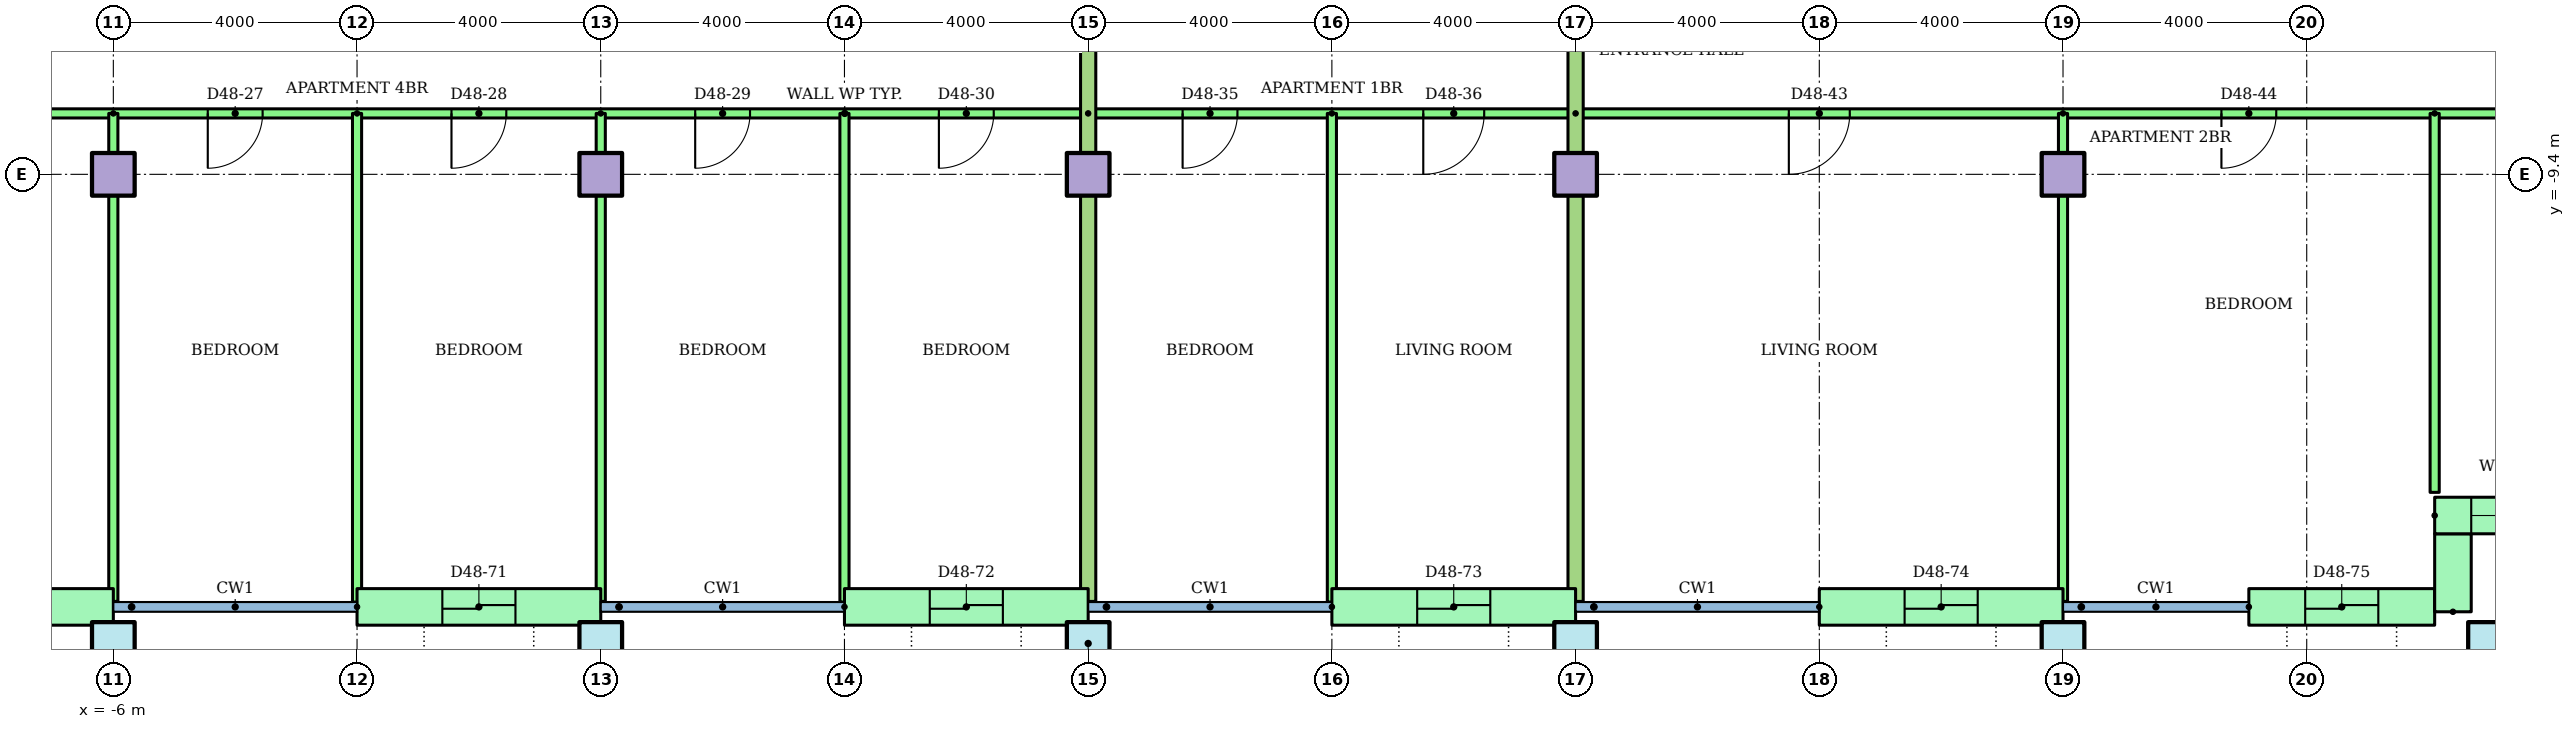
"""IFC4 building model, lengths in metres.
Left out: names, types, materials, properties, quantities, classifications, styles, units other than length and angle.
Written with IfcOpenShell. Run it as: python <this file> out.ifc"""

import sys

from ifc_helpers import new_model, si_unit, direction, frame, frame_2d, origin, origin_2d, place, context, subcontext, project, spatial, rectangle, hollow_rectangle, extrude, element, fill, save


model = new_model("IFC4")
c1 = context("Model", 3, precision=1e-05, world=origin(), true_north=direction((0.0, 1.0)))
c2 = subcontext(c1, "Body", "Model", "MODEL_VIEW")
j1 = project(units=[si_unit("LENGTHUNIT", "METRE"), si_unit("PLANEANGLEUNIT", "RADIAN")], contexts=[c1])
p1 = place(None, origin())
s1 = spatial("IfcSite", under=j1, at=p1, CompositionType="ELEMENT")
p2 = place(p1, origin())
s2 = spatial("IfcBuilding", under=s1, at=p2, CompositionType="ELEMENT")
p3 = place(p2, frame((0.0, 0.0, 184.5)))
s3 = spatial("IfcBuildingStorey", under=s2, at=p3, CompositionType="ELEMENT", Elevation=184.5)
for number, where in (
    (1, (-6.0, -17.1, 0.0)),
    (2, (2.0, -17.1, 0.0)),
    (3, (10.0, -17.1, 0.0)),
    (4, (18.0, -17.1, 0.0)),
    (5, (26.0, -17.1, 0.0)),
    (6, (33.0, -17.1, 0.0)),
):
    element("IfcColumn", number, at=place(p3, frame(where)), inside=s3, PredefinedType="COLUMN", context=c2, shape_type="SweptSolid", body=[
        extrude(hollow_rectangle(XDim=0.7, YDim=0.7, WallThickness=0.036, at=origin_2d()), origin(), (0.0, 0.0, 1.0), 3.2),
    ])
for number, where in (
    (7, (-6.0, -9.4, 0.0)),
    (8, (2.0, -9.4, 0.0)),
    (9, (10.0, -9.4, 0.0)),
    (10, (18.0, -9.4, 0.0)),
    (11, (26.0, -9.4, 0.0)),
):
    element("IfcColumn", number, at=place(p3, frame(where)), inside=s3, PredefinedType="COLUMN", context=c2, shape_type="SweptSolid", body=[
        extrude(rectangle(XDim=0.7, YDim=0.7, at=origin_2d()), origin(), (0.0, 0.0, 1.0), 3.2),
    ])
p4 = place(p3, frame((-10.0, -16.5, 0.0)))
e12 = element("IfcWall", 12, at=p4, inside=s3, PredefinedType="STANDARD", context=c2, shape_type="SweptSolid", body=[
    extrude(rectangle(XDim=4.0, YDim=0.6, at=frame_2d((2.0, 0.0))), origin(), (0.0, 0.0, 1.0), 2.92),
])
p5 = place(p4, frame((1.4, 0.0, 0.0)))
e13 = element("IfcOpeningElement", 13, at=p5, cuts=e12, PredefinedType="OPENING", context=c2, shape_type="SweptSolid", body=[
    extrude(rectangle(XDim=1.2, YDim=2.1, at=frame_2d((0.6, 1.05))), frame((0.0, 0.31, 0.0), z_axis=(0.0, -1.0, 0.0), x_axis=(1.0, 0.0, 0.0)), (0.0, 0.0, 1.0), 0.62),
])
p6 = place(p3, frame((-2.0, -16.5, 0.0)))
e14 = element("IfcWall", 14, at=p6, inside=s3, PredefinedType="STANDARD", context=c2, shape_type="SweptSolid", body=[
    extrude(rectangle(XDim=4.0, YDim=0.6, at=frame_2d((2.0, 0.0))), origin(), (0.0, 0.0, 1.0), 2.92),
])
p7 = place(p6, frame((1.4, 0.0, 0.0)))
e15 = element("IfcOpeningElement", 15, at=p7, cuts=e14, PredefinedType="OPENING", context=c2, shape_type="SweptSolid", body=[
    extrude(rectangle(XDim=1.2, YDim=2.1, at=frame_2d((0.6, 1.05))), frame((0.0, 0.31, 0.0), z_axis=(0.0, -1.0, 0.0), x_axis=(1.0, 0.0, 0.0)), (0.0, 0.0, 1.0), 0.62),
])
p8 = place(p3, frame((6.0, -16.5, 0.0)))
e16 = element("IfcWall", 16, at=p8, inside=s3, PredefinedType="STANDARD", context=c2, shape_type="SweptSolid", body=[
    extrude(rectangle(XDim=4.0, YDim=0.6, at=frame_2d((2.0, 0.0))), origin(), (0.0, 0.0, 1.0), 2.92),
])
p9 = place(p8, frame((1.4, 0.0, 0.0)))
e17 = element("IfcOpeningElement", 17, at=p9, cuts=e16, PredefinedType="OPENING", context=c2, shape_type="SweptSolid", body=[
    extrude(rectangle(XDim=1.2, YDim=2.1, at=frame_2d((0.6, 1.05))), frame((0.0, 0.31, 0.0), z_axis=(0.0, -1.0, 0.0), x_axis=(1.0, 0.0, 0.0)), (0.0, 0.0, 1.0), 0.62),
])
p10 = place(p3, frame((14.0, -16.5, 0.0)))
e18 = element("IfcWall", 18, at=p10, inside=s3, PredefinedType="STANDARD", context=c2, shape_type="SweptSolid", body=[
    extrude(rectangle(XDim=4.0, YDim=0.6, at=frame_2d((2.0, 0.0))), origin(), (0.0, 0.0, 1.0), 2.92),
])
p11 = place(p10, frame((1.4, 0.0, 0.0)))
e19 = element("IfcOpeningElement", 19, at=p11, cuts=e18, PredefinedType="OPENING", context=c2, shape_type="SweptSolid", body=[
    extrude(rectangle(XDim=1.2, YDim=2.1, at=frame_2d((0.6, 1.05))), frame((0.0, 0.31, 0.0), z_axis=(0.0, -1.0, 0.0), x_axis=(1.0, 0.0, 0.0)), (0.0, 0.0, 1.0), 0.62),
])
p12 = place(p3, frame((22.0, -16.5, 0.0)))
e20 = element("IfcWall", 20, at=p12, inside=s3, PredefinedType="STANDARD", context=c2, shape_type="SweptSolid", body=[
    extrude(rectangle(XDim=4.0, YDim=0.6, at=frame_2d((2.0, 0.0))), origin(), (0.0, 0.0, 1.0), 2.92),
])
p13 = place(p12, frame((1.4, 0.0, 0.0)))
e21 = element("IfcOpeningElement", 21, at=p13, cuts=e20, PredefinedType="OPENING", context=c2, shape_type="SweptSolid", body=[
    extrude(rectangle(XDim=1.2, YDim=2.1, at=frame_2d((0.6, 1.05))), frame((0.0, 0.31, 0.0), z_axis=(0.0, -1.0, 0.0), x_axis=(1.0, 0.0, 0.0)), (0.0, 0.0, 1.0), 0.62),
])
p14 = place(p3, frame((29.05, -16.5, 0.0)))
e22 = element("IfcWall", 22, at=p14, inside=s3, PredefinedType="STANDARD", context=c2, shape_type="SweptSolid", body=[
    extrude(rectangle(XDim=3.05, YDim=0.6, at=frame_2d((1.525, 0.0))), origin(), (0.0, 0.0, 1.0), 2.92),
])
p15 = place(p14, frame((0.925, 0.0, 0.0)))
e23 = element("IfcOpeningElement", 23, at=p15, cuts=e22, PredefinedType="OPENING", context=c2, shape_type="SweptSolid", body=[
    extrude(rectangle(XDim=1.2, YDim=2.1, at=frame_2d((0.6, 1.05))), frame((0.0, 0.31, 0.0), z_axis=(0.0, -1.0, 0.0), x_axis=(1.0, 0.0, 0.0)), (0.0, 0.0, 1.0), 0.62),
])
p16 = place(p3, frame((32.4, -16.58, 0.0), z_axis=(0.0, 0.0, 1.0), x_axis=(0.0, 1.0, 0.0)))
e24 = element("IfcWall", 24, at=p16, inside=s3, PredefinedType="STANDARD", context=c2, shape_type="SweptSolid", body=[
    extrude(rectangle(XDim=1.28, YDim=0.6, at=frame_2d((0.64, 0.0))), origin(), (0.0, 0.0, 1.0), 2.92),
])
p17 = place(p3, frame((32.1, -15.0, 0.0)))
e25 = element("IfcWall", 25, at=p17, inside=s3, PredefinedType="STANDARD", context=c2, shape_type="SweptSolid", body=[
    extrude(rectangle(XDim=2.1, YDim=0.6, at=frame_2d((1.05, 0.0))), origin(), (0.0, 0.0, 1.0), 2.92),
])
p18 = place(p17, frame((0.6, 0.0, 0.9)))
e26 = element("IfcOpeningElement", 26, at=p18, cuts=e25, PredefinedType="OPENING", context=c2, shape_type="SweptSolid", body=[
    extrude(rectangle(XDim=0.9, YDim=1.5, at=frame_2d((0.45, 0.75))), frame((0.0, 0.31, 0.0), z_axis=(0.0, -1.0, 0.0), x_axis=(1.0, 0.0, 0.0)), (0.0, 0.0, 1.0), 0.62),
])
p19 = place(p3, frame((10.0, -8.4, 0.0), z_axis=(0.0, 0.0, 1.0), x_axis=(-1.0, 0.0, 0.0)))
e27 = element("IfcWall", 27, at=p19, inside=s3, PredefinedType="PARTITIONING", context=c2, shape_type="SweptSolid", body=[
    extrude(rectangle(XDim=24.0, YDim=0.15, at=frame_2d((12.0, 0.0))), origin(), (0.0, 0.0, 1.0), 2.4),
])
p20 = place(p19, frame((19.5, 0.0, 0.0)))
e28 = element("IfcOpeningElement", 28, at=p20, cuts=e27, PredefinedType="OPENING", context=c2, shape_type="SweptSolid", body=[
    extrude(rectangle(XDim=1.0, YDim=2.1, at=frame_2d((0.5, 1.05))), frame((0.0, 0.085, 0.0), z_axis=(0.0, -1.0, 0.0), x_axis=(1.0, 0.0, 0.0)), (0.0, 0.0, 1.0), 0.17),
])
p21 = place(p19, frame((13.55, 0.0, 0.0)))
e29 = element("IfcOpeningElement", 29, at=p21, cuts=e27, PredefinedType="OPENING", context=c2, shape_type="SweptSolid", body=[
    extrude(rectangle(XDim=0.9, YDim=2.1, at=frame_2d((0.45, 1.05))), frame((0.0, 0.085, 0.0), z_axis=(0.0, -1.0, 0.0), x_axis=(1.0, 0.0, 0.0)), (0.0, 0.0, 1.0), 0.17),
])
p22 = place(p19, frame((9.55, 0.0, 0.0)))
e30 = element("IfcOpeningElement", 30, at=p22, cuts=e27, PredefinedType="OPENING", context=c2, shape_type="SweptSolid", body=[
    extrude(rectangle(XDim=0.9, YDim=2.1, at=frame_2d((0.45, 1.05))), frame((0.0, 0.085, 0.0), z_axis=(0.0, -1.0, 0.0), x_axis=(1.0, 0.0, 0.0)), (0.0, 0.0, 1.0), 0.17),
])
p23 = place(p19, frame((5.55, 0.0, 0.0)))
e31 = element("IfcOpeningElement", 31, at=p23, cuts=e27, PredefinedType="OPENING", context=c2, shape_type="SweptSolid", body=[
    extrude(rectangle(XDim=0.9, YDim=2.1, at=frame_2d((0.45, 1.05))), frame((0.0, 0.085, 0.0), z_axis=(0.0, -1.0, 0.0), x_axis=(1.0, 0.0, 0.0)), (0.0, 0.0, 1.0), 0.17),
])
p24 = place(p19, frame((1.55, 0.0, 0.0)))
e32 = element("IfcOpeningElement", 32, at=p24, cuts=e27, PredefinedType="OPENING", context=c2, shape_type="SweptSolid", body=[
    extrude(rectangle(XDim=0.9, YDim=2.1, at=frame_2d((0.45, 1.05))), frame((0.0, 0.085, 0.0), z_axis=(0.0, -1.0, 0.0), x_axis=(1.0, 0.0, 0.0)), (0.0, 0.0, 1.0), 0.17),
])
p25 = place(p3, frame((-6.0, -8.4, 0.0), z_axis=(0.0, 0.0, 1.0), x_axis=(0.0, -1.0, 0.0)))
e33 = element("IfcWall", 33, at=p25, inside=s3, PredefinedType="PARTITIONING", context=c2, shape_type="SweptSolid", body=[
    extrude(rectangle(XDim=8.01, YDim=0.15, at=frame_2d((4.005, 0.0))), origin(), (0.0, 0.0, 1.0), 2.4),
])
p26 = place(p3, frame((-2.0, -8.4, 0.0), z_axis=(0.0, 0.0, 1.0), x_axis=(0.0, -1.0, 0.0)))
e34 = element("IfcWall", 34, at=p26, inside=s3, PredefinedType="PARTITIONING", context=c2, shape_type="SweptSolid", body=[
    extrude(rectangle(XDim=8.021, YDim=0.15, at=frame_2d((4.01, 0.0))), origin(), (0.0, 0.0, 1.0), 2.4),
])
p27 = place(p3, frame((2.0, -8.4, 0.0), z_axis=(0.0, 0.0, 1.0), x_axis=(0.0, -1.0, 0.0)))
e35 = element("IfcWall", 35, at=p27, inside=s3, PredefinedType="PARTITIONING", context=c2, shape_type="SweptSolid", body=[
    extrude(rectangle(XDim=8.01, YDim=0.15, at=frame_2d((4.005, 0.0))), origin(), (0.0, 0.0, 1.0), 2.4),
])
p28 = place(p3, frame((6.0, -8.4, 0.0), z_axis=(0.0, 0.0, 1.0), x_axis=(0.0, -1.0, 0.0)))
e36 = element("IfcWall", 36, at=p28, inside=s3, PredefinedType="PARTITIONING", context=c2, shape_type="SweptSolid", body=[
    extrude(rectangle(XDim=8.021, YDim=0.15, at=frame_2d((4.01, 0.0))), origin(), (0.0, 0.0, 1.0), 2.4),
])
p29 = place(p3, frame((18.0, -8.4, 0.0), z_axis=(0.0, 0.0, 1.0), x_axis=(-1.0, 0.0, 0.0)))
e37 = element("IfcWall", 37, at=p29, inside=s3, PredefinedType="PARTITIONING", context=c2, shape_type="SweptSolid", body=[
    extrude(rectangle(XDim=8.0, YDim=0.15, at=frame_2d((4.0, 0.0))), origin(), (0.0, 0.0, 1.0), 2.4),
])
p30 = place(p29, frame((5.55, 0.0, 0.0)))
e38 = element("IfcOpeningElement", 38, at=p30, cuts=e37, PredefinedType="OPENING", context=c2, shape_type="SweptSolid", body=[
    extrude(rectangle(XDim=0.9, YDim=2.1, at=frame_2d((0.45, 1.05))), frame((0.0, 0.085, 0.0), z_axis=(0.0, -1.0, 0.0), x_axis=(1.0, 0.0, 0.0)), (0.0, 0.0, 1.0), 0.17),
])
p31 = place(p29, frame((1.5, 0.0, 0.0)))
e39 = element("IfcOpeningElement", 39, at=p31, cuts=e37, PredefinedType="OPENING", context=c2, shape_type="SweptSolid", body=[
    extrude(rectangle(XDim=1.0, YDim=2.1, at=frame_2d((0.5, 1.05))), frame((0.0, 0.085, 0.0), z_axis=(0.0, -1.0, 0.0), x_axis=(1.0, 0.0, 0.0)), (0.0, 0.0, 1.0), 0.17),
])
p32 = place(p3, frame((14.0, -8.4, 0.0), z_axis=(0.0, 0.0, 1.0), x_axis=(0.0, -1.0, 0.0)))
e40 = element("IfcWall", 40, at=p32, inside=s3, PredefinedType="PARTITIONING", context=c2, shape_type="SweptSolid", body=[
    extrude(rectangle(XDim=8.021, YDim=0.15, at=frame_2d((4.01, 0.0))), origin(), (0.0, 0.0, 1.0), 2.4),
])
p33 = place(p3, frame((10.0, -1.4, 0.0), z_axis=(0.0, 0.0, 1.0), x_axis=(0.0, -1.0, 0.0)))
e41 = element("IfcWall", 41, at=p33, inside=s3, PredefinedType="PARTITIONING", context=c2, shape_type="SweptSolid", body=[
    extrude(rectangle(XDim=15.01, YDim=0.25, at=frame_2d((7.505, 0.0))), origin(), (0.0, 0.0, 1.0), 2.4),
])
p34 = place(p3, frame((36.82, -8.4, 0.0), z_axis=(0.0, 0.0, 1.0), x_axis=(-1.0, 0.0, 0.0)))
e42 = element("IfcWall", 42, at=p34, inside=s3, PredefinedType="PARTITIONING", context=c2, shape_type="SweptSolid", body=[
    extrude(rectangle(XDim=18.82, YDim=0.15, at=frame_2d((9.41, 0.0))), origin(), (0.0, 0.0, 1.0), 2.4),
])
p35 = place(p34, frame((14.32, 0.0, 0.0)))
e43 = element("IfcOpeningElement", 43, at=p35, cuts=e42, PredefinedType="OPENING", context=c2, shape_type="SweptSolid", body=[
    extrude(rectangle(XDim=1.0, YDim=2.1, at=frame_2d((0.5, 1.05))), frame((0.0, 0.085, 0.0), z_axis=(0.0, -1.0, 0.0), x_axis=(1.0, 0.0, 0.0)), (0.0, 0.0, 1.0), 0.17),
])
p36 = place(p34, frame((7.32, 0.0, 0.0)))
e44 = element("IfcOpeningElement", 44, at=p36, cuts=e42, PredefinedType="OPENING", context=c2, shape_type="SweptSolid", body=[
    extrude(rectangle(XDim=0.9, YDim=2.1, at=frame_2d((0.45, 1.05))), frame((0.0, 0.085, 0.0), z_axis=(0.0, -1.0, 0.0), x_axis=(1.0, 0.0, 0.0)), (0.0, 0.0, 1.0), 0.17),
])
p37 = place(p34, frame((1.373, 0.0, 0.0)))
e45 = element("IfcOpeningElement", 45, at=p37, cuts=e42, PredefinedType="OPENING", context=c2, shape_type="SweptSolid", body=[
    extrude(rectangle(XDim=0.9, YDim=2.1, at=frame_2d((0.45, 1.05))), frame((0.0, 0.085, 0.0), z_axis=(0.0, -1.0, 0.0), x_axis=(1.0, 0.0, 0.0)), (0.0, 0.0, 1.0), 0.17),
])
p38 = place(p3, frame((26.0, -8.4, 0.0), z_axis=(0.0, 0.0, 1.0), x_axis=(0.0, -1.0, 0.0)))
e46 = element("IfcWall", 46, at=p38, inside=s3, PredefinedType="PARTITIONING", context=c2, shape_type="SweptSolid", body=[
    extrude(rectangle(XDim=8.01, YDim=0.15, at=frame_2d((4.005, 0.0))), origin(), (0.0, 0.0, 1.0), 2.4),
])
p39 = place(p3, frame((32.1, -8.4, 0.0), z_axis=(0.0, 0.0, 1.0), x_axis=(0.0, -1.0, 0.0)))
e47 = element("IfcWall", 47, at=p39, inside=s3, PredefinedType="PARTITIONING", context=c2, shape_type="SweptSolid", body=[
    extrude(rectangle(XDim=6.22, YDim=0.15, at=frame_2d((3.11, 0.0))), origin(), (0.0, 0.0, 1.0), 2.4),
])
p40 = place(p3, frame((18.0, -1.4, 0.0), z_axis=(0.0, 0.0, 1.0), x_axis=(0.0, -1.0, 0.0)))
e48 = element("IfcWall", 48, at=p40, inside=s3, PredefinedType="PARTITIONING", context=c2, shape_type="SweptSolid", body=[
    extrude(rectangle(XDim=15.01, YDim=0.25, at=frame_2d((7.505, 0.0))), origin(), (0.0, 0.0, 1.0), 2.4),
])
p41 = place(p18, origin())
e49 = element("IfcWindow", 49, at=p41, inside=s3, PartitioningType="SINGLE_PANEL", PredefinedType="WINDOW", context=c2, shape_type="SweptSolid", body=[
    extrude(rectangle(XDim=0.9, YDim=1.5, at=frame_2d((0.45, 0.75))), frame((0.0, 0.03, 0.0), z_axis=(0.0, -1.0, 0.0), x_axis=(1.0, 0.0, 0.0)), (0.0, 0.0, 1.0), 0.06),
])
fill(e26, e49)
p42 = place(p21, origin())
e50 = element("IfcDoor", 50, at=p42, inside=s3, OperationType="SINGLE_SWING_RIGHT", PredefinedType="DOOR", context=c2, shape_type="SweptSolid", body=[
    extrude(rectangle(XDim=0.9, YDim=2.1, at=frame_2d((0.45, 1.05))), frame((0.0, 0.025, 0.0), z_axis=(0.0, -1.0, 0.0), x_axis=(1.0, 0.0, 0.0)), (0.0, 0.0, 1.0), 0.05),
])
fill(e29, e50)
p43 = place(p22, origin())
e51 = element("IfcDoor", 51, at=p43, inside=s3, OperationType="SINGLE_SWING_RIGHT", PredefinedType="DOOR", context=c2, shape_type="SweptSolid", body=[
    extrude(rectangle(XDim=0.9, YDim=2.1, at=frame_2d((0.45, 1.05))), frame((0.0, 0.025, 0.0), z_axis=(0.0, -1.0, 0.0), x_axis=(1.0, 0.0, 0.0)), (0.0, 0.0, 1.0), 0.05),
])
fill(e30, e51)
p44 = place(p23, origin())
e52 = element("IfcDoor", 52, at=p44, inside=s3, OperationType="SINGLE_SWING_RIGHT", PredefinedType="DOOR", context=c2, shape_type="SweptSolid", body=[
    extrude(rectangle(XDim=0.9, YDim=2.1, at=frame_2d((0.45, 1.05))), frame((0.0, 0.025, 0.0), z_axis=(0.0, -1.0, 0.0), x_axis=(1.0, 0.0, 0.0)), (0.0, 0.0, 1.0), 0.05),
])
fill(e31, e52)
p45 = place(p24, origin())
e53 = element("IfcDoor", 53, at=p45, inside=s3, OperationType="SINGLE_SWING_RIGHT", PredefinedType="DOOR", context=c2, shape_type="SweptSolid", body=[
    extrude(rectangle(XDim=0.9, YDim=2.1, at=frame_2d((0.45, 1.05))), frame((0.0, 0.025, 0.0), z_axis=(0.0, -1.0, 0.0), x_axis=(1.0, 0.0, 0.0)), (0.0, 0.0, 1.0), 0.05),
])
fill(e32, e53)
p46 = place(p30, origin())
e54 = element("IfcDoor", 54, at=p46, inside=s3, OperationType="SINGLE_SWING_RIGHT", PredefinedType="DOOR", context=c2, shape_type="SweptSolid", body=[
    extrude(rectangle(XDim=0.9, YDim=2.1, at=frame_2d((0.45, 1.05))), frame((0.0, 0.025, 0.0), z_axis=(0.0, -1.0, 0.0), x_axis=(1.0, 0.0, 0.0)), (0.0, 0.0, 1.0), 0.05),
])
fill(e38, e54)
p47 = place(p31, origin())
e55 = element("IfcDoor", 55, at=p47, inside=s3, OperationType="SINGLE_SWING_RIGHT", PredefinedType="DOOR", context=c2, shape_type="SweptSolid", body=[
    extrude(rectangle(XDim=1.0, YDim=2.1, at=frame_2d((0.5, 1.05))), frame((0.0, 0.025, 0.0), z_axis=(0.0, -1.0, 0.0), x_axis=(1.0, 0.0, 0.0)), (0.0, 0.0, 1.0), 0.05),
])
fill(e39, e55)
p48 = place(p35, origin())
e56 = element("IfcDoor", 56, at=p48, inside=s3, OperationType="SINGLE_SWING_RIGHT", PredefinedType="DOOR", context=c2, shape_type="SweptSolid", body=[
    extrude(rectangle(XDim=1.0, YDim=2.1, at=frame_2d((0.5, 1.05))), frame((0.0, 0.025, 0.0), z_axis=(0.0, -1.0, 0.0), x_axis=(1.0, 0.0, 0.0)), (0.0, 0.0, 1.0), 0.05),
])
fill(e43, e56)
p49 = place(p36, origin())
e57 = element("IfcDoor", 57, at=p49, inside=s3, OperationType="SINGLE_SWING_RIGHT", PredefinedType="DOOR", context=c2, shape_type="SweptSolid", body=[
    extrude(rectangle(XDim=0.9, YDim=2.1, at=frame_2d((0.45, 1.05))), frame((0.0, 0.025, 0.0), z_axis=(0.0, -1.0, 0.0), x_axis=(1.0, 0.0, 0.0)), (0.0, 0.0, 1.0), 0.05),
])
fill(e44, e57)
p50 = place(p7, origin())
e58 = element("IfcDoor", 58, at=p50, inside=s3, OperationType="SLIDING_TO_LEFT", PredefinedType="DOOR", context=c2, shape_type="SweptSolid", body=[
    extrude(rectangle(XDim=1.2, YDim=2.1, at=frame_2d((0.6, 1.05))), frame((0.0, 0.025, 0.0), z_axis=(0.0, -1.0, 0.0), x_axis=(1.0, 0.0, 0.0)), (0.0, 0.0, 1.0), 0.05),
])
fill(e15, e58)
p51 = place(p9, origin())
e59 = element("IfcDoor", 59, at=p51, inside=s3, OperationType="SLIDING_TO_LEFT", PredefinedType="DOOR", context=c2, shape_type="SweptSolid", body=[
    extrude(rectangle(XDim=1.2, YDim=2.1, at=frame_2d((0.6, 1.05))), frame((0.0, 0.025, 0.0), z_axis=(0.0, -1.0, 0.0), x_axis=(1.0, 0.0, 0.0)), (0.0, 0.0, 1.0), 0.05),
])
fill(e17, e59)
p52 = place(p11, origin())
e60 = element("IfcDoor", 60, at=p52, inside=s3, OperationType="SLIDING_TO_LEFT", PredefinedType="DOOR", context=c2, shape_type="SweptSolid", body=[
    extrude(rectangle(XDim=1.2, YDim=2.1, at=frame_2d((0.6, 1.05))), frame((0.0, 0.025, 0.0), z_axis=(0.0, -1.0, 0.0), x_axis=(1.0, 0.0, 0.0)), (0.0, 0.0, 1.0), 0.05),
])
fill(e19, e60)
p53 = place(p13, origin())
e61 = element("IfcDoor", 61, at=p53, inside=s3, OperationType="SLIDING_TO_LEFT", PredefinedType="DOOR", context=c2, shape_type="SweptSolid", body=[
    extrude(rectangle(XDim=1.2, YDim=2.1, at=frame_2d((0.6, 1.05))), frame((0.0, 0.025, 0.0), z_axis=(0.0, -1.0, 0.0), x_axis=(1.0, 0.0, 0.0)), (0.0, 0.0, 1.0), 0.05),
])
fill(e21, e61)
p54 = place(p15, origin())
e62 = element("IfcDoor", 62, at=p54, inside=s3, OperationType="SLIDING_TO_LEFT", PredefinedType="DOOR", context=c2, shape_type="SweptSolid", body=[
    extrude(rectangle(XDim=1.2, YDim=2.1, at=frame_2d((0.6, 1.05))), frame((0.0, 0.025, 0.0), z_axis=(0.0, -1.0, 0.0), x_axis=(1.0, 0.0, 0.0)), (0.0, 0.0, 1.0), 0.05),
])
fill(e23, e62)
save(model, sys.argv[1])
